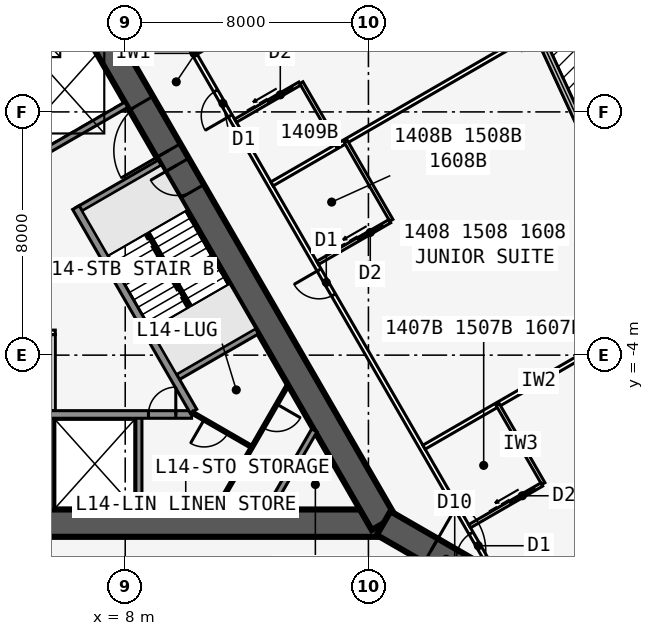
"""IFC4 building model, lengths in metres.
Left out: names, types, materials, properties, quantities, classifications, styles, units other than length and angle.
Written with IfcOpenShell. Run it as: python <this file> out.ifc"""

import sys

from ifc_helpers import new_model, si_unit, direction, frame, frame_2d, origin, place, context, subcontext, project, spatial, rectangle, extrude, element, fill, save


model = new_model("IFC4")
c1 = context("Model", 3, precision=1e-05, world=origin(), true_north=direction((0.0, 1.0)))
c2 = subcontext(c1, "Body", "Model", "MODEL_VIEW")
j1 = project(units=[si_unit("LENGTHUNIT", "METRE"), si_unit("PLANEANGLEUNIT", "RADIAN")], contexts=[c1])
p1 = place(None, origin())
s1 = spatial("IfcSite", under=j1, at=p1, CompositionType="ELEMENT")
p2 = place(p1, origin())
s2 = spatial("IfcBuilding", under=s1, at=p2, CompositionType="ELEMENT")
p3 = place(p2, frame((0.0, 0.0, 59.1)))
s3 = spatial("IfcBuildingStorey", under=s2, at=p3, CompositionType="ELEMENT", Elevation=59.1)
p4 = place(p3, frame((-16.5, -9.526, 0.0), z_axis=(0.0, 0.0, 1.0), x_axis=(1.0, 0.0, 0.0)))
e1 = element("IfcWall", 1, at=p4, inside=s3, PredefinedType="SHEAR", context=c2, shape_type="SweptSolid", body=[
    extrude(rectangle(XDim=33.0, YDim=0.9, at=frame_2d((16.5, 0.0))), origin(), (0.0, 0.0, 1.0), 3.4),
])
p5 = place(p4, frame((14.05, 0.0, 0.0)))
e2 = element("IfcOpeningElement", 2, at=p5, cuts=e1, PredefinedType="OPENING", context=c2, shape_type="SweptSolid", body=[
    extrude(rectangle(XDim=1.8, YDim=2.13, at=frame_2d((0.9, 1.065))), frame((0.0, 0.46, 0.0), z_axis=(0.0, -1.0, 0.0), x_axis=(1.0, 0.0, 0.0)), (0.0, 0.0, 1.0), 0.92),
])
p6 = place(p3, frame((-0.55, -5.951, 0.0), z_axis=(0.0, 0.0, 1.0), x_axis=(1.0, 0.0, 0.0)))
e3 = element("IfcWall", 3, at=p6, inside=s3, PredefinedType="SOLIDWALL", context=c2, shape_type="SweptSolid", body=[
    extrude(rectangle(XDim=10.733, YDim=0.25, at=frame_2d((5.366, 0.0))), origin(), (0.0, 0.0, 1.0), 3.235),
])
p7 = place(p6, frame((9.314, 0.0, 0.0)))
e4 = element("IfcOpeningElement", 4, at=p7, cuts=e3, PredefinedType="OPENING", context=c2, shape_type="SweptSolid", body=[
    extrude(rectangle(XDim=0.9, YDim=2.13, at=frame_2d((0.45, 1.065))), frame((0.0, 0.135, 0.0), z_axis=(0.0, -1.0, 0.0), x_axis=(1.0, 0.0, 0.0)), (0.0, 0.0, 1.0), 0.27),
])
p8 = place(p6, frame((1.05, 0.0, 0.0)))
e5 = element("IfcOpeningElement", 5, at=p8, cuts=e3, PredefinedType="OPENING", context=c2, shape_type="SweptSolid", body=[
    extrude(rectangle(XDim=1.1, YDim=2.13, at=frame_2d((0.55, 1.065))), frame((0.0, 0.135, 0.0), z_axis=(0.0, -1.0, 0.0), x_axis=(1.0, 0.0, 0.0)), (0.0, 0.0, 1.0), 0.27),
])
p9 = place(p6, frame((4.05, 0.0, 0.0)))
e6 = element("IfcOpeningElement", 6, at=p9, cuts=e3, PredefinedType="OPENING", context=c2, shape_type="SweptSolid", body=[
    extrude(rectangle(XDim=1.1, YDim=2.13, at=frame_2d((0.55, 1.065))), frame((0.0, 0.135, 0.0), z_axis=(0.0, -1.0, 0.0), x_axis=(1.0, 0.0, 0.0)), (0.0, 0.0, 1.0), 0.27),
])
for number, where, z_axis, x_axis in (
    (7, (5.55, -5.951, 0.0), (0.0, 0.0, 1.0), (0.0, -1.0, 0.0)),
    (8, (8.45, -5.951, 0.0), (0.0, 0.0, 1.0), (0.0, -1.0, 0.0)),
):
    element("IfcWall", number, at=place(p3, frame(where, z_axis=z_axis, x_axis=x_axis)), inside=s3, PredefinedType="SOLIDWALL", context=c2, shape_type="SweptSolid", body=[
        extrude(rectangle(XDim=3.125, YDim=0.2, at=frame_2d((1.562, 0.0))), origin(), (0.0, 0.0, 1.0), 3.235),
    ])
p10 = place(p3, frame((16.5, -9.526, 0.0), z_axis=(0.0, 0.0, 1.0), x_axis=(-0.499999749417, 0.866025548458, 0.0)))
e9 = element("IfcWall", 9, at=p10, inside=s3, PredefinedType="SHEAR", context=c2, shape_type="SweptSolid", body=[
    extrude(rectangle(XDim=33.0, YDim=0.9, at=frame_2d((16.5, 0.0))), origin(), (0.0, 0.0, 1.0), 3.4),
])
p11 = place(p10, frame((14.15, 0.0, 0.0)))
e10 = element("IfcOpeningElement", 10, at=p11, cuts=e9, PredefinedType="OPENING", context=c2, shape_type="SweptSolid", body=[
    extrude(rectangle(XDim=1.8, YDim=2.13, at=frame_2d((0.9, 1.065))), frame((0.0, 0.46, 0.0), z_axis=(0.0, -1.0, 0.0), x_axis=(1.0, 0.0, 0.0)), (0.0, 0.0, 1.0), 0.92),
])
p12 = place(p10, frame((12.6, 0.0, 0.0)))
e11 = element("IfcOpeningElement", 11, at=p12, cuts=e9, PredefinedType="OPENING", context=c2, shape_type="SweptSolid", body=[
    extrude(rectangle(XDim=1.0, YDim=2.13, at=frame_2d((0.5, 1.065))), frame((0.0, 0.46, 0.0), z_axis=(0.0, -1.0, 0.0), x_axis=(1.0, 0.0, 0.0)), (0.0, 0.0, 1.0), 0.92),
])
p13 = place(p3, frame((10.245, -5.843, 0.0), z_axis=(0.0, 0.0, 1.0), x_axis=(-0.499993009313, 0.866029439822, 0.0)))
e12 = element("IfcWall", 12, at=p13, inside=s3, PredefinedType="SOLIDWALL", context=c2, shape_type="SweptSolid", body=[
    extrude(rectangle(XDim=7.733, YDim=0.25, at=frame_2d((3.866, 0.0))), origin(), (0.0, 0.0, 1.0), 3.235),
])
for number, where, z_axis, x_axis in (
    (13, (9.629, -4.775, 0.0), (0.0, 0.0, 1.0), (0.866, 0.5, 0.0)),
    (14, (6.429, 0.767, 0.0), (0.0, 0.0, 1.0), (0.866, 0.5, 0.0)),
    (15, (5.329, 2.673, 0.0), (0.0, 0.0, 1.0), (0.866, 0.5, 0.0)),
    (16, (3.879, 5.184, 0.0), (0.0, 0.0, 1.0), (0.866, 0.5, 0.0)),
):
    element("IfcWall", number, at=place(p3, frame(where, z_axis=z_axis, x_axis=x_axis)), inside=s3, PredefinedType="SOLIDWALL", context=c2, shape_type="SweptSolid", body=[
        extrude(rectangle(XDim=3.125, YDim=0.2, at=frame_2d((1.562, 0.0))), origin(), (0.0, 0.0, 1.0), 3.235),
    ])
p14 = place(p3, frame((16.5, -9.526, 0.0), z_axis=(0.0, 0.0, 1.0), x_axis=(0.866031398331, -0.499989616998, 0.0)))
e17 = element("IfcWall", 17, at=p14, inside=s3, PredefinedType="SHEAR", context=c2, shape_type="SweptSolid", body=[
    extrude(rectangle(XDim=4.746, YDim=0.9, at=frame_2d((2.373, 0.0))), origin(), (0.0, 0.0, 1.0), 3.4),
])
p15 = place(p14, frame((1.8, 0.0, 0.0)))
e18 = element("IfcOpeningElement", 18, at=p15, cuts=e17, PredefinedType="OPENING", context=c2, shape_type="SweptSolid", body=[
    extrude(rectangle(XDim=1.8, YDim=2.13, at=frame_2d((0.9, 1.065))), frame((0.0, 0.46, 0.0), z_axis=(0.0, -1.0, 0.0), x_axis=(1.0, 0.0, 0.0)), (0.0, 0.0, 1.0), 0.92),
])
p16 = place(p3, frame((23.648, 2.119, 0.0), z_axis=(0.0, 0.0, 1.0), x_axis=(-0.419203100754, 0.907892482796, 0.0)))
e19 = element("IfcWall", 19, at=p16, inside=s3, PredefinedType="STANDARD", context=c2, shape_type="SweptSolid", body=[
    extrude(rectangle(XDim=5.021, YDim=0.25, at=frame_2d((2.51, 0.0))), origin(), (0.0, 0.0, 1.0), 3.235),
])
p17 = place(p16, frame((0.71, 0.0, 0.45)))
e20 = element("IfcOpeningElement", 20, at=p17, cuts=e19, PredefinedType="OPENING", context=c2, shape_type="SweptSolid", body=[
    extrude(rectangle(XDim=3.6, YDim=2.4, at=frame_2d((1.8, 1.2))), frame((0.0, 0.135, 0.0), z_axis=(0.0, -1.0, 0.0), x_axis=(1.0, 0.0, 0.0)), (0.0, 0.0, 1.0), 0.27),
])
p18 = place(p3, frame((20.027, -10.985, 0.0), z_axis=(0.0, 0.0, 1.0), x_axis=(-0.500001677587, 0.866024435227, 0.0)))
e21 = element("IfcWall", 21, at=p18, inside=s3, PredefinedType="PARTITIONING", context=c2, shape_type="SweptSolid", body=[
    extrude(rectangle(XDim=39.054, YDim=0.15, at=frame_2d((19.527, 0.0))), origin(), (0.0, 0.0, 1.0), 3.235),
])
p19 = place(p18, frame((0.352, 0.0, 0.0)))
e22 = element("IfcOpeningElement", 22, at=p19, cuts=e21, PredefinedType="OPENING", context=c2, shape_type="SweptSolid", body=[
    extrude(rectangle(XDim=0.95, YDim=2.13, at=frame_2d((0.475, 1.065))), frame((0.0, 0.085, 0.0), z_axis=(0.0, -1.0, 0.0), x_axis=(1.0, 0.0, 0.0)), (0.0, 0.0, 1.0), 0.17),
])
p20 = place(p18, frame((10.352, 0.0, 0.0)))
e23 = element("IfcOpeningElement", 23, at=p20, cuts=e21, PredefinedType="OPENING", context=c2, shape_type="SweptSolid", body=[
    extrude(rectangle(XDim=0.95, YDim=2.13, at=frame_2d((0.475, 1.065))), frame((0.0, 0.085, 0.0), z_axis=(0.0, -1.0, 0.0), x_axis=(1.0, 0.0, 0.0)), (0.0, 0.0, 1.0), 0.17),
])
p21 = place(p18, frame((17.152, 0.0, 0.0)))
e24 = element("IfcOpeningElement", 24, at=p21, cuts=e21, PredefinedType="OPENING", context=c2, shape_type="SweptSolid", body=[
    extrude(rectangle(XDim=0.95, YDim=2.13, at=frame_2d((0.475, 1.065))), frame((0.0, 0.085, 0.0), z_axis=(0.0, -1.0, 0.0), x_axis=(1.0, 0.0, 0.0)), (0.0, 0.0, 1.0), 0.17),
])
p22 = place(p18, frame((20.952, 0.0, 0.0)))
e25 = element("IfcOpeningElement", 25, at=p22, cuts=e21, PredefinedType="OPENING", context=c2, shape_type="SweptSolid", body=[
    extrude(rectangle(XDim=0.95, YDim=2.13, at=frame_2d((0.475, 1.065))), frame((0.0, 0.085, 0.0), z_axis=(0.0, -1.0, 0.0), x_axis=(1.0, 0.0, 0.0)), (0.0, 0.0, 1.0), 0.17),
])
p23 = place(p18, frame((27.752, 0.0, 0.0)))
e26 = element("IfcOpeningElement", 26, at=p23, cuts=e21, PredefinedType="OPENING", context=c2, shape_type="SweptSolid", body=[
    extrude(rectangle(XDim=0.95, YDim=2.13, at=frame_2d((0.475, 1.065))), frame((0.0, 0.085, 0.0), z_axis=(0.0, -1.0, 0.0), x_axis=(1.0, 0.0, 0.0)), (0.0, 0.0, 1.0), 0.17),
])
p24 = place(p18, frame((37.752, 0.0, 0.0)))
e27 = element("IfcOpeningElement", 27, at=p24, cuts=e21, PredefinedType="OPENING", context=c2, shape_type="SweptSolid", body=[
    extrude(rectangle(XDim=0.95, YDim=2.13, at=frame_2d((0.475, 1.065))), frame((0.0, 0.085, 0.0), z_axis=(0.0, -1.0, 0.0), x_axis=(1.0, 0.0, 0.0)), (0.0, 0.0, 1.0), 0.17),
])
p25 = place(p3, frame((17.829, -7.027, 0.0), z_axis=(0.0, 0.0, 1.0), x_axis=(0.866032659912, 0.499987431809, 0.0)))
e28 = element("IfcWall", 28, at=p25, inside=s3, PredefinedType="PARTITIONING", context=c2, shape_type="SweptSolid", body=[
    extrude(rectangle(XDim=8.72, YDim=0.15, at=frame_2d((4.36, 0.0))), origin(), (0.0, 0.0, 1.0), 2.389),
])
p26 = place(p3, frame((12.829, 1.633, 0.0), z_axis=(0.0, 0.0, 1.0), x_axis=(0.866026934769, 0.499997348248, 0.0)))
e29 = element("IfcWall", 29, at=p26, inside=s3, PredefinedType="PARTITIONING", context=c2, shape_type="SweptSolid", body=[
    extrude(rectangle(XDim=9.943, YDim=0.15, at=frame_2d((4.971, 0.0))), origin(), (0.0, 0.0, 1.0), 2.389),
])
p27 = place(p3, frame((10.329, 5.963, 0.0), z_axis=(0.0, 0.0, 1.0), x_axis=(0.866021688545, 0.500006434927, 0.0)))
e30 = element("IfcWall", 30, at=p27, inside=s3, PredefinedType="PARTITIONING", context=c2, shape_type="SweptSolid", body=[
    extrude(rectangle(XDim=10.096, YDim=0.15, at=frame_2d((5.048, 0.0))), origin(), (0.0, 0.0, 1.0), 2.389),
])
p28 = place(p3, frame((21.753, -8.225, 0.0), z_axis=(0.0, 0.0, 1.0), x_axis=(-0.499990139034, 0.866031096941, 0.0)))
e31 = element("IfcWall", 31, at=p28, inside=s3, PredefinedType="PLUMBINGWALL", context=c2, shape_type="SweptSolid", body=[
    extrude(rectangle(XDim=3.0, YDim=0.12, at=frame_2d((1.5, 0.0))), origin(), (0.0, 0.0, 1.0), 3.235),
])
p29 = place(p3, frame((19.329, -9.625, 0.0), z_axis=(0.0, 0.0, 1.0), x_axis=(0.866035715982, 0.499982138324, 0.0)))
e32 = element("IfcWall", 32, at=p29, inside=s3, PredefinedType="PLUMBINGWALL", context=c2, shape_type="SweptSolid", body=[
    extrude(rectangle(XDim=2.74, YDim=0.12, at=frame_2d((1.37, 0.0))), origin(), (0.0, 0.0, 1.0), 3.235),
])
p30 = place(p29, frame((1.55, 0.0, 0.0)))
e33 = element("IfcOpeningElement", 33, at=p30, cuts=e32, PredefinedType="OPENING", context=c2, shape_type="SweptSolid", body=[
    extrude(rectangle(XDim=0.9, YDim=2.13, at=frame_2d((0.45, 1.065))), frame((0.0, 0.07, 0.0), z_axis=(0.0, -1.0, 0.0), x_axis=(1.0, 0.0, 0.0)), (0.0, 0.0, 1.0), 0.14),
])
p31 = place(p3, frame((16.753, 0.435, 0.0), z_axis=(0.0, 0.0, 1.0), x_axis=(-0.499990139034, 0.866031096941, 0.0)))
e34 = element("IfcWall", 34, at=p31, inside=s3, PredefinedType="PLUMBINGWALL", context=c2, shape_type="SweptSolid", body=[
    extrude(rectangle(XDim=3.0, YDim=0.12, at=frame_2d((1.5, 0.0))), origin(), (0.0, 0.0, 1.0), 3.235),
])
p32 = place(p3, frame((14.329, -0.965, 0.0), z_axis=(0.0, 0.0, 1.0), x_axis=(0.866035715982, 0.499982138324, 0.0)))
e35 = element("IfcWall", 35, at=p32, inside=s3, PredefinedType="PLUMBINGWALL", context=c2, shape_type="SweptSolid", body=[
    extrude(rectangle(XDim=2.74, YDim=0.12, at=frame_2d((1.37, 0.0))), origin(), (0.0, 0.0, 1.0), 3.235),
])
p33 = place(p32, frame((1.55, 0.0, 0.0)))
e36 = element("IfcOpeningElement", 36, at=p33, cuts=e35, PredefinedType="OPENING", context=c2, shape_type="SweptSolid", body=[
    extrude(rectangle(XDim=0.9, YDim=2.13, at=frame_2d((0.45, 1.065))), frame((0.0, 0.07, 0.0), z_axis=(0.0, -1.0, 0.0), x_axis=(1.0, 0.0, 0.0)), (0.0, 0.0, 1.0), 0.14),
])
p34 = place(p3, frame((14.993, 2.883, 0.0), z_axis=(0.0, 0.0, 1.0), x_axis=(-0.500001309137, 0.866024647952, 0.0)))
e37 = element("IfcWall", 37, at=p34, inside=s3, PredefinedType="PLUMBINGWALL", context=c2, shape_type="SweptSolid", body=[
    extrude(rectangle(XDim=2.4, YDim=0.12, at=frame_2d((1.2, 0.0))), origin(), (0.0, 0.0, 1.0), 3.235),
])
p35 = place(p3, frame((11.628, 3.711, 0.0), z_axis=(0.0, 0.0, 1.0), x_axis=(0.866048967903, 0.499959183527, 0.0)))
e38 = element("IfcWall", 38, at=p35, inside=s3, PredefinedType="PLUMBINGWALL", context=c2, shape_type="SweptSolid", body=[
    extrude(rectangle(XDim=2.44, YDim=0.12, at=frame_2d((1.22, 0.0))), origin(), (0.0, 0.0, 1.0), 3.235),
])
p36 = place(p35, frame((1.25, 0.0, 0.0)))
e39 = element("IfcOpeningElement", 39, at=p36, cuts=e38, PredefinedType="OPENING", context=c2, shape_type="SweptSolid", body=[
    extrude(rectangle(XDim=0.9, YDim=2.13, at=frame_2d((0.45, 1.065))), frame((0.0, 0.07, 0.0), z_axis=(0.0, -1.0, 0.0), x_axis=(1.0, 0.0, 0.0)), (0.0, 0.0, 1.0), 0.14),
])
p37 = place(p3, frame((-2.65, -3.251, 0.0), z_axis=(0.0, 0.0, 1.0), x_axis=(1.0, 0.0, 0.0)))
e40 = element("IfcWall", 40, at=p37, inside=s3, PredefinedType="PARTITIONING", context=c2, shape_type="SweptSolid", body=[
    extrude(rectangle(XDim=8.35, YDim=0.15, at=frame_2d((4.175, 0.0))), origin(), (0.0, 0.0, 1.0), 3.235),
])
p38 = place(p3, frame((5.625, -5.826, 0.0), z_axis=(0.0, 0.0, 1.0), x_axis=(0.0, 1.0, 0.0)))
e41 = element("IfcWall", 41, at=p38, inside=s3, PredefinedType="PARTITIONING", context=c2, shape_type="SweptSolid", body=[
    extrude(rectangle(XDim=2.5, YDim=0.15, at=frame_2d((1.25, 0.0))), origin(), (0.0, 0.0, 1.0), 3.235),
])
p39 = place(p3, frame((14.219, -6.476, 0.0), z_axis=(0.0, 0.0, 1.0), x_axis=(-0.499952404951, -0.866052881055, 0.0)))
e42 = element("IfcWall", 42, at=p39, inside=s3, PredefinedType="SOLIDWALL", context=c2, shape_type="SweptSolid", body=[
    extrude(rectangle(XDim=3.002, YDim=0.2, at=frame_2d((1.501, 0.0))), origin(), (0.0, 0.0, 1.0), 3.235),
])
p40 = place(p3, frame((13.354, -4.976, 0.0), z_axis=(0.0, 0.0, 1.0), x_axis=(-0.499999210213, -0.866025859768, 0.0)))
e43 = element("IfcWall", 43, at=p40, inside=s3, PredefinedType="PARTITIONING", context=c2, shape_type="SweptSolid", body=[
    extrude(rectangle(XDim=4.734, YDim=0.1, at=frame_2d((2.367, 0.0))), origin(), (0.0, 0.0, 1.0), 3.235),
])
p41 = place(p40, frame((0.734, 0.0, 0.0)))
e44 = element("IfcOpeningElement", 44, at=p41, cuts=e43, PredefinedType="OPENING", context=c2, shape_type="SweptSolid", body=[
    extrude(rectangle(XDim=0.9, YDim=2.13, at=frame_2d((0.45, 1.065))), frame((0.0, 0.06, 0.0), z_axis=(0.0, -1.0, 0.0), x_axis=(1.0, 0.0, 0.0)), (0.0, 0.0, 1.0), 0.12),
])
p42 = place(p3, frame((12.17, -7.026, 0.0), z_axis=(0.0, 0.0, 1.0), x_axis=(-0.866015833478, 0.50001657589, 0.0)))
e45 = element("IfcWall", 45, at=p42, inside=s3, PredefinedType="PARTITIONING", context=c2, shape_type="SweptSolid", body=[
    extrude(rectangle(XDim=2.275, YDim=0.1, at=frame_2d((1.138, 0.0))), origin(), (0.0, 0.0, 1.0), 3.235),
])
p43 = place(p42, frame((0.915, 0.0, 0.0)))
e46 = element("IfcOpeningElement", 46, at=p43, cuts=e45, PredefinedType="OPENING", context=c2, shape_type="SweptSolid", body=[
    extrude(rectangle(XDim=0.9, YDim=2.13, at=frame_2d((0.45, 1.065))), frame((0.0, 0.06, 0.0), z_axis=(0.0, -1.0, 0.0), x_axis=(1.0, 0.0, 0.0)), (0.0, 0.0, 1.0), 0.12),
])
p44 = place(p3, frame((10.135, -2.401, 0.0), z_axis=(0.0, 0.0, 1.0), x_axis=(-0.499992232847, 0.866029888106, 0.0)))
e47 = element("IfcWall", 47, at=p44, inside=s3, PredefinedType="SOLIDWALL", context=c2, shape_type="SweptSolid", body=[
    extrude(rectangle(XDim=2.794, YDim=0.1, at=frame_2d((1.397, 0.0))), origin(), (0.0, 0.0, 1.0), 3.4),
])
p45 = place(p17, origin())
e48 = element("IfcWindow", 48, at=p45, inside=s3, PartitioningType="SINGLE_PANEL", PredefinedType="WINDOW", context=c2, shape_type="SweptSolid", body=[
    extrude(rectangle(XDim=3.6, YDim=2.4, at=frame_2d((1.8, 1.2))), frame((0.0, 0.03, 0.0), z_axis=(0.0, -1.0, 0.0), x_axis=(1.0, 0.0, 0.0)), (0.0, 0.0, 1.0), 0.06),
])
fill(e20, e48)
p46 = place(p30, origin())
e49 = element("IfcDoor", 49, at=p46, inside=s3, OperationType="SLIDING_TO_LEFT", PredefinedType="DOOR", context=c2, shape_type="SweptSolid", body=[
    extrude(rectangle(XDim=0.9, YDim=2.13, at=frame_2d((0.45, 1.065))), frame((0.0, 0.025, 0.0), z_axis=(0.0, -1.0, 0.0), x_axis=(1.0, 0.0, 0.0)), (0.0, 0.0, 1.0), 0.05),
])
fill(e33, e49)
p47 = place(p19, origin())
e50 = element("IfcDoor", 50, at=p47, inside=s3, OperationType="SINGLE_SWING_LEFT", PredefinedType="DOOR", context=c2, shape_type="SweptSolid", body=[
    extrude(rectangle(XDim=0.95, YDim=2.13, at=frame_2d((0.475, 1.065))), frame((0.0, 0.025, 0.0), z_axis=(0.0, -1.0, 0.0), x_axis=(1.0, 0.0, 0.0)), (0.0, 0.0, 1.0), 0.05),
])
fill(e22, e50)
p48 = place(p33, origin())
e51 = element("IfcDoor", 51, at=p48, inside=s3, OperationType="SLIDING_TO_LEFT", PredefinedType="DOOR", context=c2, shape_type="SweptSolid", body=[
    extrude(rectangle(XDim=0.9, YDim=2.13, at=frame_2d((0.45, 1.065))), frame((0.0, 0.025, 0.0), z_axis=(0.0, -1.0, 0.0), x_axis=(1.0, 0.0, 0.0)), (0.0, 0.0, 1.0), 0.05),
])
fill(e36, e51)
p49 = place(p20, origin())
e52 = element("IfcDoor", 52, at=p49, inside=s3, OperationType="SINGLE_SWING_RIGHT", PredefinedType="DOOR", context=c2, shape_type="SweptSolid", body=[
    extrude(rectangle(XDim=0.95, YDim=2.13, at=frame_2d((0.475, 1.065))), frame((0.0, 0.025, 0.0), z_axis=(0.0, -1.0, 0.0), x_axis=(1.0, 0.0, 0.0)), (0.0, 0.0, 1.0), 0.05),
])
fill(e23, e52)
p50 = place(p36, origin())
e53 = element("IfcDoor", 53, at=p50, inside=s3, OperationType="SLIDING_TO_LEFT", PredefinedType="DOOR", context=c2, shape_type="SweptSolid", body=[
    extrude(rectangle(XDim=0.9, YDim=2.13, at=frame_2d((0.45, 1.065))), frame((0.0, 0.025, 0.0), z_axis=(0.0, -1.0, 0.0), x_axis=(1.0, 0.0, 0.0)), (0.0, 0.0, 1.0), 0.05),
])
fill(e39, e53)
p51 = place(p21, origin())
e54 = element("IfcDoor", 54, at=p51, inside=s3, OperationType="SINGLE_SWING_LEFT", PredefinedType="DOOR", context=c2, shape_type="SweptSolid", body=[
    extrude(rectangle(XDim=0.95, YDim=2.13, at=frame_2d((0.475, 1.065))), frame((0.0, 0.025, 0.0), z_axis=(0.0, -1.0, 0.0), x_axis=(1.0, 0.0, 0.0)), (0.0, 0.0, 1.0), 0.05),
])
fill(e24, e54)
p52 = place(p11, origin())
e55 = element("IfcDoor", 55, at=p52, inside=s3, OperationType="DOUBLE_DOOR_SINGLE_SWING", PredefinedType="DOOR", context=c2, shape_type="SweptSolid", body=[
    extrude(rectangle(XDim=1.8, YDim=2.13, at=frame_2d((0.9, 1.065))), frame((0.0, 0.025, 0.0), z_axis=(0.0, -1.0, 0.0), x_axis=(1.0, 0.0, 0.0)), (0.0, 0.0, 1.0), 0.05),
])
fill(e10, e55)
p53 = place(p12, origin())
e56 = element("IfcDoor", 56, at=p53, inside=s3, OperationType="SINGLE_SWING_RIGHT", PredefinedType="DOOR", context=c2, shape_type="SweptSolid", body=[
    extrude(rectangle(XDim=1.0, YDim=2.13, at=frame_2d((0.5, 1.065))), frame((0.0, 0.025, 0.0), z_axis=(0.0, -1.0, 0.0), x_axis=(1.0, 0.0, 0.0)), (0.0, 0.0, 1.0), 0.05),
])
fill(e11, e56)
p54 = place(p15, origin())
e57 = element("IfcDoor", 57, at=p54, inside=s3, OperationType="DOUBLE_DOOR_DOUBLE_SWING", PredefinedType="DOOR", context=c2, shape_type="SweptSolid", body=[
    extrude(rectangle(XDim=1.8, YDim=2.13, at=frame_2d((0.9, 1.065))), frame((0.0, 0.025, 0.0), z_axis=(0.0, -1.0, 0.0), x_axis=(1.0, 0.0, 0.0)), (0.0, 0.0, 1.0), 0.05),
])
fill(e18, e57)
p55 = place(p41, origin())
e58 = element("IfcDoor", 58, at=p55, inside=s3, OperationType="SINGLE_SWING_LEFT", PredefinedType="DOOR", context=c2, shape_type="SweptSolid", body=[
    extrude(rectangle(XDim=0.9, YDim=2.13, at=frame_2d((0.45, 1.065))), frame((0.0, 0.025, 0.0), z_axis=(0.0, -1.0, 0.0), x_axis=(1.0, 0.0, 0.0)), (0.0, 0.0, 1.0), 0.05),
])
fill(e44, e58)
p56 = place(p7, origin())
e59 = element("IfcDoor", 59, at=p56, inside=s3, OperationType="SINGLE_SWING_RIGHT", PredefinedType="DOOR", context=c2, shape_type="SweptSolid", body=[
    extrude(rectangle(XDim=0.9, YDim=2.13, at=frame_2d((0.45, 1.065))), frame((0.0, 0.025, 0.0), z_axis=(0.0, -1.0, 0.0), x_axis=(1.0, 0.0, 0.0)), (0.0, 0.0, 1.0), 0.05),
])
fill(e4, e59)
p57 = place(p43, origin())
e60 = element("IfcDoor", 60, at=p57, inside=s3, OperationType="SINGLE_SWING_RIGHT", PredefinedType="DOOR", context=c2, shape_type="SweptSolid", body=[
    extrude(rectangle(XDim=0.9, YDim=2.13, at=frame_2d((0.45, 1.065))), frame((0.0, 0.025, 0.0), z_axis=(0.0, -1.0, 0.0), x_axis=(1.0, 0.0, 0.0)), (0.0, 0.0, 1.0), 0.05),
])
fill(e46, e60)
save(model, sys.argv[1])
